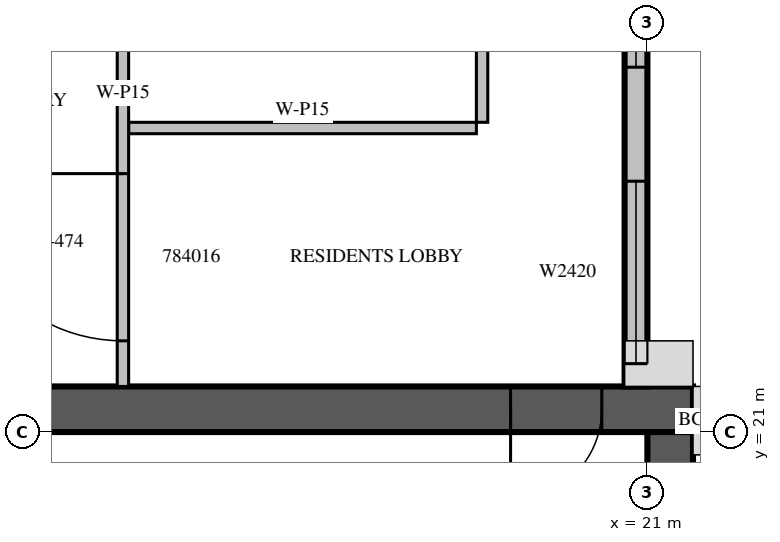
"""IFC4 building model, lengths in metres.
Left out: names, types, materials, properties, quantities, classifications, styles, units other than length and angle.
Written with IfcOpenShell. Run it as: python <this file> out.ifc"""

import sys

from ifc_helpers import new_model, si_unit, direction, frame, frame_2d, origin, place, context, subcontext, project, spatial, rectangle, extrude, source, transform, mapped, element, fill, save


model = new_model("IFC4")
c1 = context("Model", 3, precision=1e-05, world=origin(), true_north=direction((0.0, 1.0)))
c2 = subcontext(c1, "Body", "Model", "MODEL_VIEW")
j1 = project(units=[si_unit("LENGTHUNIT", "METRE"), si_unit("PLANEANGLEUNIT", "RADIAN")], contexts=[c1])
p1 = place(None, origin())
s1 = spatial("IfcSite", under=j1, at=p1, CompositionType="ELEMENT")
p2 = place(p1, origin())
s2 = spatial("IfcBuilding", under=s1, at=p2, CompositionType="ELEMENT")
p3 = place(p2, frame((0.0, 0.0, 354.5)))
s3 = spatial("IfcBuildingStorey", under=s2, at=p3, CompositionType="ELEMENT", Elevation=354.5)
m1 = source(origin(), c2, "Body", "SweptSolid", [
    extrude(rectangle(XDim=11.1, YDim=0.6, at=frame_2d((5.55, 0.0))), origin(), (0.0, 0.0, 1.0), 3.5),
])
p4 = place(p3, frame((10.5, 21.3, 0.0), z_axis=(0.0, 0.0, 1.0), x_axis=(1.0, 0.0, 0.0)))
e1 = element("IfcWall", 1, at=p4, inside=s3, PredefinedType="SHEAR", context=c2, shape_type="MappedRepresentation", body=[
    mapped(m1, transform((0.0, 0.0, 0.0), scale=1.0)),
])
m2 = source(origin(), c2, "Body", "SweptSolid", [
    extrude(rectangle(XDim=1.2, YDim=2.1, at=frame_2d((0.6, 1.05))), frame((0.0, 0.31, 0.0), z_axis=(0.0, -1.0, 0.0), x_axis=(1.0, 0.0, 0.0)), (0.0, 0.0, 1.0), 0.62),
])
p5 = place(p4, frame((8.7, 0.0, 0.0)))
e2 = element("IfcOpeningElement", 2, at=p5, cuts=e1, PredefinedType="OPENING", context=c2, shape_type="MappedRepresentation", body=[
    mapped(m2, transform((0.0, 0.0, 0.0), scale=1.0)),
])
m3 = source(origin(), c2, "Body", "SweptSolid", [
    extrude(rectangle(XDim=10.5, YDim=0.6, at=frame_2d((5.25, 0.0))), origin(), (0.0, 0.0, 1.0), 3.5),
])
p6 = place(p3, frame((21.3, 10.5, 0.0), z_axis=(0.0, 0.0, 1.0), x_axis=(0.0, 1.0, 0.0)))
e3 = element("IfcWall", 3, at=p6, inside=s3, PredefinedType="SHEAR", context=c2, shape_type="MappedRepresentation", body=[
    mapped(m3, transform((0.0, 0.0, 0.0), scale=1.0)),
])
m4 = source(origin(), c2, "Body", "SweptSolid", [
    extrude(rectangle(XDim=1.2, YDim=2.4, at=frame_2d((0.6, 1.2))), frame((0.0, 0.31, 0.0), z_axis=(0.0, -1.0, 0.0), x_axis=(1.0, 0.0, 0.0)), (0.0, 0.0, 1.0), 0.62),
])
p7 = place(p6, frame((5.7, 0.0, 0.6)))
e4 = element("IfcOpeningElement", 4, at=p7, cuts=e3, PredefinedType="OPENING", context=c2, shape_type="MappedRepresentation", body=[
    mapped(m4, transform((0.0, 0.0, 0.0), scale=1.0)),
])
m5 = source(origin(), c2, "Body", "SweptSolid", [
    extrude(rectangle(XDim=7.5, YDim=0.3, at=frame_2d((3.75, 0.0))), origin(), (0.0, 0.0, 1.0), 3.1),
])
p8 = place(p3, frame((20.85, 21.6, 0.0), z_axis=(0.0, 0.0, 1.0), x_axis=(0.0, 1.0, 0.0)))
e5 = element("IfcWall", 5, at=p8, inside=s3, PredefinedType="STANDARD", context=c2, shape_type="MappedRepresentation", body=[
    mapped(m5, transform((0.0, 0.0, 0.0), scale=1.0)),
])
m6 = source(origin(), c2, "Body", "SweptSolid", [
    extrude(rectangle(XDim=2.4, YDim=2.0, at=frame_2d((1.2, 1.0))), frame((0.0, 0.16, 0.0), z_axis=(0.0, -1.0, 0.0), x_axis=(1.0, 0.0, 0.0)), (0.0, 0.0, 1.0), 0.32),
])
p9 = place(p8, frame((0.3, 0.0, 0.6)))
e6 = element("IfcOpeningElement", 6, at=p9, cuts=e5, PredefinedType="OPENING", context=c2, shape_type="MappedRepresentation", body=[
    mapped(m6, transform((0.0, 0.0, 0.0), scale=1.0)),
])
m7 = source(origin(), c2, "Body", "SweptSolid", [
    extrude(rectangle(XDim=3.0, YDim=2.0, at=frame_2d((1.5, 1.0))), frame((0.0, 0.16, 0.0), z_axis=(0.0, -1.0, 0.0), x_axis=(1.0, 0.0, 0.0)), (0.0, 0.0, 1.0), 0.32),
])
p10 = place(p8, frame((4.2, 0.0, 0.6)))
e7 = element("IfcOpeningElement", 7, at=p10, cuts=e5, PredefinedType="OPENING", context=c2, shape_type="MappedRepresentation", body=[
    mapped(m7, transform((0.0, 0.0, 0.0), scale=1.0)),
])
m8 = source(origin(), c2, "Body", "SweptSolid", [
    extrude(rectangle(XDim=4.575, YDim=0.15, at=frame_2d((2.288, 0.0))), origin(), (0.0, 0.0, 1.0), 3.1),
])
p11 = place(p3, frame((14.175, 25.0, 0.0), z_axis=(0.0, 0.0, 1.0), x_axis=(1.0, 0.0, 0.0)))
e8 = element("IfcWall", 8, at=p11, inside=s3, PredefinedType="PARTITIONING", context=c2, shape_type="MappedRepresentation", body=[
    mapped(m8, transform((0.0, 0.0, 0.0), scale=1.0)),
])
m9 = source(origin(), c2, "Body", "SweptSolid", [
    extrude(rectangle(XDim=4.25, YDim=0.15, at=frame_2d((2.125, 0.0))), origin(), (0.0, 0.0, 1.0), 3.1),
])
p12 = place(p3, frame((18.825, 25.075, 0.0), z_axis=(0.0, 0.0, 1.0), x_axis=(0.0, 1.0, 0.0)))
e9 = element("IfcWall", 9, at=p12, inside=s3, PredefinedType="PARTITIONING", context=c2, shape_type="MappedRepresentation", body=[
    mapped(m9, transform((0.0, 0.0, 0.0), scale=1.0)),
])
m10 = source(origin(), c2, "Body", "SweptSolid", [
    extrude(rectangle(XDim=1.0, YDim=2.1, at=frame_2d((0.5, 1.05))), frame((0.0, 0.085, 0.0), z_axis=(0.0, -1.0, 0.0), x_axis=(1.0, 0.0, 0.0)), (0.0, 0.0, 1.0), 0.17),
])
p13 = place(p12, frame((1.625, 0.0, 0.0)))
e10 = element("IfcOpeningElement", 10, at=p13, cuts=e9, PredefinedType="OPENING", context=c2, shape_type="MappedRepresentation", body=[
    mapped(m10, transform((0.0, 0.0, 0.0), scale=1.0)),
])
m11 = source(origin(), c2, "Body", "SweptSolid", [
    extrude(rectangle(XDim=7.725, YDim=0.15, at=frame_2d((3.862, 0.0))), origin(), (0.0, 0.0, 1.0), 3.1),
])
p14 = place(p3, frame((14.1, 29.325, 0.0), z_axis=(0.0, 0.0, 1.0), x_axis=(0.0, -1.0, 0.0)))
e11 = element("IfcWall", 11, at=p14, inside=s3, PredefinedType="PARTITIONING", context=c2, shape_type="MappedRepresentation", body=[
    mapped(m11, transform((0.0, 0.0, 0.0), scale=1.0)),
])
m12 = source(origin(), c2, "Body", "SweptSolid", [
    extrude(rectangle(XDim=2.2, YDim=2.1, at=frame_2d((1.1, 1.05))), frame((0.0, 0.085, 0.0), z_axis=(0.0, -1.0, 0.0), x_axis=(1.0, 0.0, 0.0)), (0.0, 0.0, 1.0), 0.17),
])
p15 = place(p14, frame((4.925, 0.0, 0.0)))
e12 = element("IfcOpeningElement", 12, at=p15, cuts=e11, PredefinedType="OPENING", context=c2, shape_type="MappedRepresentation", body=[
    mapped(m12, transform((0.0, 0.0, 0.0), scale=1.0)),
])
m13 = source(origin(), c2, "Body", "SweptSolid", [
    extrude(rectangle(XDim=2.4, YDim=2.0, at=frame_2d((1.2, 1.0))), frame((0.0, 0.03, 0.0), z_axis=(0.0, -1.0, 0.0), x_axis=(1.0, 0.0, 0.0)), (0.0, 0.0, 1.0), 0.06),
])
p16 = place(p9, origin())
e13 = element("IfcWindow", 13, at=p16, inside=s3, PartitioningType="SINGLE_PANEL", PredefinedType="WINDOW", context=c2, shape_type="MappedRepresentation", body=[
    mapped(m13, transform((0.0, 0.0, 0.0), scale=1.0)),
])
fill(e6, e13)
m14 = source(origin(), c2, "Body", "SweptSolid", [
    extrude(rectangle(XDim=3.0, YDim=2.0, at=frame_2d((1.5, 1.0))), frame((0.0, 0.03, 0.0), z_axis=(0.0, -1.0, 0.0), x_axis=(1.0, 0.0, 0.0)), (0.0, 0.0, 1.0), 0.06),
])
p17 = place(p10, origin())
e14 = element("IfcWindow", 14, at=p17, inside=s3, PartitioningType="SINGLE_PANEL", PredefinedType="WINDOW", context=c2, shape_type="MappedRepresentation", body=[
    mapped(m14, transform((0.0, 0.0, 0.0), scale=1.0)),
])
fill(e7, e14)
m15 = source(origin(), c2, "Body", "SweptSolid", [
    extrude(rectangle(XDim=1.2, YDim=2.1, at=frame_2d((0.6, 1.05))), frame((0.0, 0.025, 0.0), z_axis=(0.0, -1.0, 0.0), x_axis=(1.0, 0.0, 0.0)), (0.0, 0.0, 1.0), 0.05),
])
p18 = place(p5, origin())
e15 = element("IfcDoor", 15, at=p18, inside=s3, OperationType="SINGLE_SWING_RIGHT", PredefinedType="DOOR", context=c2, shape_type="MappedRepresentation", body=[
    mapped(m15, transform((0.0, 0.0, 0.0), scale=1.0)),
])
fill(e2, e15)
m16 = source(origin(), c2, "Body", "SweptSolid", [
    extrude(rectangle(XDim=2.2, YDim=2.1, at=frame_2d((1.1, 1.05))), frame((0.0, 0.025, 0.0), z_axis=(0.0, -1.0, 0.0), x_axis=(1.0, 0.0, 0.0)), (0.0, 0.0, 1.0), 0.05),
])
p19 = place(p15, origin())
e16 = element("IfcDoor", 16, at=p19, inside=s3, OperationType="DOUBLE_DOOR_SINGLE_SWING", PredefinedType="DOOR", context=c2, shape_type="MappedRepresentation", body=[
    mapped(m16, transform((0.0, 0.0, 0.0), scale=1.0)),
])
fill(e12, e16)
save(model, sys.argv[1])
